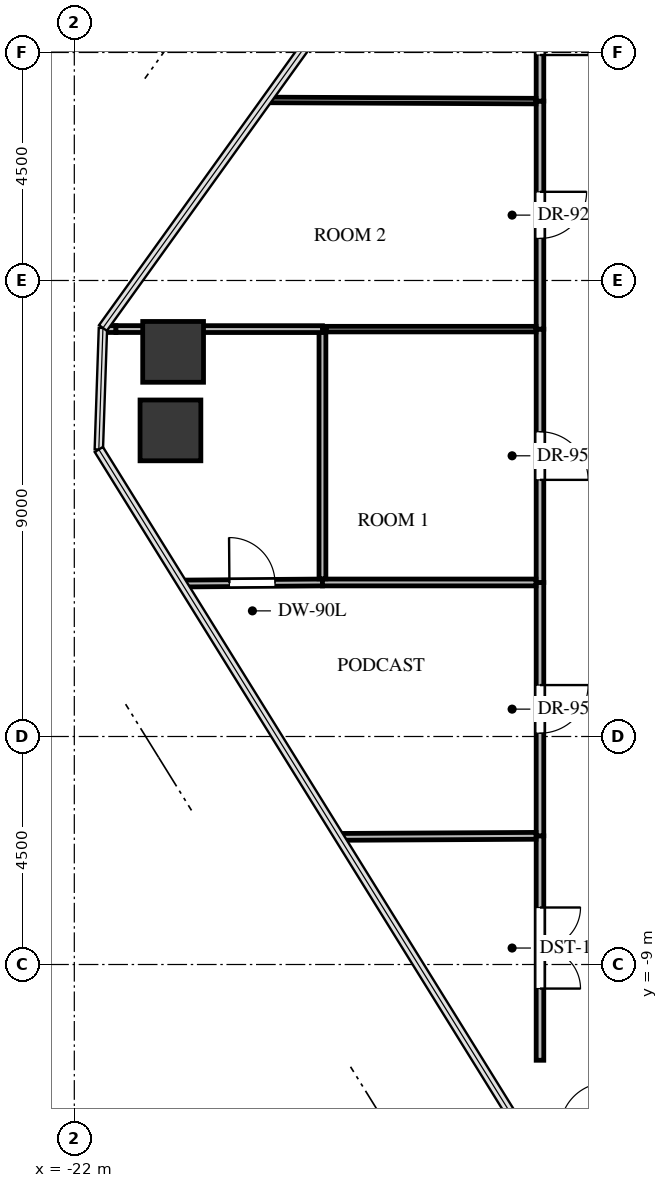
"""IFC4 building model, lengths in metres.
Left out: names, types, materials, properties, quantities, classifications, styles, units other than length and angle.
Written with IfcOpenShell. Run it as: python <this file> out.ifc"""

import sys

from ifc_helpers import new_model, si_unit, direction, frame, frame_2d, origin, origin_2d, place, context, subcontext, project, spatial, rectangle, extrude, source, transform, mapped, element, fill, save


model = new_model("IFC4")
c1 = context("Model", 3, precision=1e-05, world=origin(), true_north=direction((0.0, 1.0)))
c2 = subcontext(c1, "Body", "Model", "MODEL_VIEW")
j1 = project(units=[si_unit("LENGTHUNIT", "METRE"), si_unit("PLANEANGLEUNIT", "RADIAN")], contexts=[c1])
p1 = place(None, origin())
s1 = spatial("IfcSite", under=j1, at=p1, CompositionType="ELEMENT")
p2 = place(p1, origin())
s2 = spatial("IfcBuilding", under=s1, at=p2, CompositionType="ELEMENT")
p3 = place(p2, frame((0.0, 0.0, 127.2)))
s3 = spatial("IfcBuildingStorey", under=s2, at=p3, CompositionType="ELEMENT", Elevation=127.2)
m1 = source(origin(), c2, "Body", "SweptSolid", [
    extrude(rectangle(XDim=1.2, YDim=1.2, at=origin_2d()), origin(), (0.0, 0.0, 1.0), 3.3),
])
for number, where, z_axis, x_axis in (
    (1, (-20.103, 1.542, -0.24), (0.0, 0.0, 1.0), (1.0, 0.0, 0.0)),
    (2, (-20.05, 3.091, -0.24), (0.0, 0.0, 1.0), (1.0, 0.0, 0.0)),
):
    element("IfcColumn", number, at=place(p3, frame(where, z_axis=z_axis, x_axis=x_axis)), inside=s3, PredefinedType="COLUMN", context=c2, shape_type="MappedRepresentation", body=[
        mapped(m1, transform((0.0, 0.0, 0.0), x_axis=(1.0, 0.0, 0.0), y_axis=(0.0, 1.0, 0.0), z_axis=(0.0, 0.0, 1.0), scale=1.0)),
    ])
p4 = place(p3, frame((-12.81, -6.46, 0.0), z_axis=(0.0, 0.0, 1.0), x_axis=(0.0, -1.0, 0.0)))
e3 = element("IfcWall", 3, at=p4, inside=s3, PredefinedType="PARTITIONING", context=c2, shape_type="SweptSolid", body=[
    extrude(rectangle(XDim=4.43, YDim=0.15, at=frame_2d((2.215, 0.0))), origin(), (0.0, 0.0, 1.0), 2.38),
])
p5 = place(p4, frame((1.415, 0.0, 0.0)))
e4 = element("IfcOpeningElement", 4, at=p5, cuts=e3, PredefinedType="OPENING", context=c2, shape_type="SweptSolid", body=[
    extrude(rectangle(XDim=1.6, YDim=2.15, at=frame_2d((0.8, 1.075))), frame((0.0, 0.085, 0.0), z_axis=(0.0, -1.0, 0.0), x_axis=(1.0, 0.0, 0.0)), (0.0, 0.0, 1.0), 0.17),
])
p6 = place(p3, frame((-12.81, -1.46, 0.0), z_axis=(0.0, 0.0, 1.0), x_axis=(0.0, -1.0, 0.0)))
e5 = element("IfcWall", 5, at=p6, inside=s3, PredefinedType="PARTITIONING", context=c2, shape_type="SweptSolid", body=[
    extrude(rectangle(XDim=5.0, YDim=0.15, at=frame_2d((2.5, 0.0))), origin(), (0.0, 0.0, 1.0), 3.045),
])
p7 = place(p6, frame((2.025, 0.0, 0.0)))
e6 = element("IfcOpeningElement", 6, at=p7, cuts=e5, PredefinedType="OPENING", context=c2, shape_type="SweptSolid", body=[
    extrude(rectangle(XDim=0.95, YDim=2.1, at=frame_2d((0.475, 1.05))), frame((0.0, 0.085, 0.0), z_axis=(0.0, -1.0, 0.0), x_axis=(1.0, 0.0, 0.0)), (0.0, 0.0, 1.0), 0.17),
])
p8 = place(p3, frame((-12.81, 3.54, 0.0), z_axis=(0.0, 0.0, 1.0), x_axis=(0.0, -1.0, 0.0)))
e7 = element("IfcWall", 7, at=p8, inside=s3, PredefinedType="PARTITIONING", context=c2, shape_type="SweptSolid", body=[
    extrude(rectangle(XDim=5.0, YDim=0.15, at=frame_2d((2.5, 0.0))), origin(), (0.0, 0.0, 1.0), 2.212),
])
p9 = place(p8, frame((2.025, 0.0, 0.0)))
e8 = element("IfcOpeningElement", 8, at=p9, cuts=e7, PredefinedType="OPENING", context=c2, shape_type="SweptSolid", body=[
    extrude(rectangle(XDim=0.95, YDim=2.1, at=frame_2d((0.475, 1.05))), frame((0.0, 0.085, 0.0), z_axis=(0.0, -1.0, 0.0), x_axis=(1.0, 0.0, 0.0)), (0.0, 0.0, 1.0), 0.17),
])
p10 = place(p3, frame((-12.81, 8.04, 0.0), z_axis=(0.0, 0.0, 1.0), x_axis=(0.0, -1.0, 0.0)))
e9 = element("IfcWall", 9, at=p10, inside=s3, PredefinedType="PARTITIONING", context=c2, shape_type="SweptSolid", body=[
    extrude(rectangle(XDim=4.5, YDim=0.15, at=frame_2d((2.25, 0.0))), origin(), (0.0, 0.0, 1.0), 3.045),
])
p11 = place(p10, frame((1.79, 0.0, 0.0)))
e10 = element("IfcOpeningElement", 10, at=p11, cuts=e9, PredefinedType="OPENING", context=c2, shape_type="SweptSolid", body=[
    extrude(rectangle(XDim=0.92, YDim=2.1, at=frame_2d((0.46, 1.05))), frame((0.0, 0.085, 0.0), z_axis=(0.0, -1.0, 0.0), x_axis=(1.0, 0.0, 0.0)), (0.0, 0.0, 1.0), 0.17),
])
p12 = place(p3, frame((-12.81, 10.81, 0.0), z_axis=(0.0, 0.0, 1.0), x_axis=(0.0, -1.0, 0.0)))
e11 = element("IfcWall", 11, at=p12, inside=s3, PredefinedType="PARTITIONING", context=c2, shape_type="SweptSolid", body=[
    extrude(rectangle(XDim=2.77, YDim=0.15, at=frame_2d((1.385, 0.0))), origin(), (0.0, 0.0, 1.0), 3.045),
])
p13 = place(p12, frame((0.91, 0.0, 0.0)))
e12 = element("IfcOpeningElement", 12, at=p13, cuts=e11, PredefinedType="OPENING", context=c2, shape_type="SweptSolid", body=[
    extrude(rectangle(XDim=0.95, YDim=2.1, at=frame_2d((0.475, 1.05))), frame((0.0, 0.085, 0.0), z_axis=(0.0, -1.0, 0.0), x_axis=(1.0, 0.0, 0.0)), (0.0, 0.0, 1.0), 0.17),
])
p14 = place(p3, frame((-16.774, -6.481, 0.0), z_axis=(0.0, 0.0, 1.0), x_axis=(0.999985736048, 0.005341132812, 0.0)))
e13 = element("IfcWall", 13, at=p14, inside=s3, PredefinedType="PARTITIONING", context=c2, shape_type="SweptSolid", body=[
    extrude(rectangle(XDim=3.885, YDim=0.135, at=frame_2d((1.943, 0.0))), origin(), (0.0, 0.0, 1.0), 2.38),
])
p15 = place(p3, frame((-19.875, -1.481, 0.0), z_axis=(0.0, 0.0, 1.0), x_axis=(0.999970654695, 0.007660923473, 0.0)))
e14 = element("IfcWall", 14, at=p15, inside=s3, PredefinedType="PARTITIONING", context=c2, shape_type="SweptSolid", body=[
    extrude(rectangle(XDim=2.772, YDim=0.135, at=frame_2d((1.386, 0.0))), origin(), (0.0, 0.0, 1.0), 2.38),
])
p16 = place(p15, frame((0.936, 0.0, 0.0)))
e15 = element("IfcOpeningElement", 15, at=p16, cuts=e14, PredefinedType="OPENING", context=c2, shape_type="SweptSolid", body=[
    extrude(rectangle(XDim=0.9, YDim=2.05, at=frame_2d((0.45, 1.025))), frame((0.0, 0.078, 0.0), z_axis=(0.0, -1.0, 0.0), x_axis=(1.0, 0.0, 0.0)), (0.0, 0.0, 1.0), 0.155),
])
p17 = place(p3, frame((-17.103, -1.46, 0.0), z_axis=(0.0, 0.0, 1.0), x_axis=(1.0, 0.0, 0.0)))
e16 = element("IfcWall", 16, at=p17, inside=s3, PredefinedType="PARTITIONING", context=c2, shape_type="SweptSolid", body=[
    extrude(rectangle(XDim=4.214, YDim=0.135, at=frame_2d((2.107, 0.0))), origin(), (0.0, 0.0, 1.0), 3.045),
])
p18 = place(p3, frame((-17.103, 3.54, 0.0), z_axis=(0.0, 0.0, 1.0), x_axis=(0.0, -1.0, 0.0)))
e17 = element("IfcWall", 17, at=p18, inside=s3, PredefinedType="PARTITIONING", context=c2, shape_type="SweptSolid", body=[
    extrude(rectangle(XDim=4.928, YDim=0.135, at=frame_2d((2.464, 0.0))), origin(), (0.0, 0.0, 1.0), 2.212),
])
p19 = place(p3, frame((-21.436, 3.542, 0.0), z_axis=(0.0, 0.0, 1.0), x_axis=(0.999999550774, -0.000947866873, 0.0)))
e18 = element("IfcWall", 18, at=p19, inside=s3, PredefinedType="PARTITIONING", context=c2, shape_type="SweptSolid", body=[
    extrude(rectangle(XDim=0.258, YDim=0.135, at=frame_2d((0.129, 0.0))), origin(), (0.0, 0.0, 1.0), 1.877),
])
p20 = place(p3, frame((-20.175, 3.541, 0.0), z_axis=(0.0, 0.0, 1.0), x_axis=(0.999999949473, -0.0003178892, 0.0)))
e19 = element("IfcWall", 19, at=p20, inside=s3, PredefinedType="PARTITIONING", context=c2, shape_type="SweptSolid", body=[
    extrude(rectangle(XDim=3.072, YDim=0.135, at=frame_2d((1.536, 0.0))), origin(), (0.0, 0.0, 1.0), 1.877),
])
p21 = place(p3, frame((-21.178, 3.541, 0.0), z_axis=(0.0, 0.0, 1.0), x_axis=(0.999999970372, -0.000243427451, 0.0)))
e20 = element("IfcWall", 20, at=p21, inside=s3, PredefinedType="PARTITIONING", context=c2, shape_type="SweptSolid", body=[
    extrude(rectangle(XDim=1.003, YDim=0.135, at=frame_2d((0.501, 0.0))), origin(), (0.0, 0.0, 1.0), 1.877),
])
p22 = place(p3, frame((-17.031, 3.54, 0.0), z_axis=(0.0, 0.0, 1.0), x_axis=(1.0, 0.0, 0.0)))
e21 = element("IfcWall", 21, at=p22, inside=s3, PredefinedType="MOVABLE", context=c2, shape_type="SweptSolid", body=[
    extrude(rectangle(XDim=4.143, YDim=0.11, at=frame_2d((2.071, 0.0))), origin(), (0.0, 0.0, 1.0), 3.045),
])
p23 = place(p3, frame((-18.202, 8.063, 0.0), z_axis=(0.0, 0.0, 1.0), x_axis=(0.999990671281, -0.004319415637, 0.0)))
e22 = element("IfcWall", 22, at=p23, inside=s3, PredefinedType="MOVABLE", context=c2, shape_type="SweptSolid", body=[
    extrude(rectangle(XDim=5.313, YDim=0.11, at=frame_2d((2.656, 0.0))), origin(), (0.0, 0.0, 1.0), 2.38),
])
m2 = source(origin(), c2, "Body", "SweptSolid", [
    extrude(rectangle(XDim=1.6, YDim=2.15, at=frame_2d((0.8, 1.075))), frame((0.0, 0.025, 0.0), z_axis=(0.0, -1.0, 0.0), x_axis=(1.0, 0.0, 0.0)), (0.0, 0.0, 1.0), 0.05),
])
p24 = place(p5, origin())
e23 = element("IfcDoor", 23, at=p24, inside=s3, OperationType="DOUBLE_DOOR_SINGLE_SWING", PredefinedType="DOOR", context=c2, shape_type="MappedRepresentation", body=[
    mapped(m2, transform((0.0, 0.0, 0.0), x_axis=(1.0, 0.0, 0.0), y_axis=(0.0, 1.0, 0.0), z_axis=(0.0, 0.0, 1.0), scale=1.0)),
])
fill(e4, e23)
m3 = source(origin(), c2, "Body", "SweptSolid", [
    extrude(rectangle(XDim=0.95, YDim=2.1, at=frame_2d((0.475, 1.05))), frame((0.0, 0.025, 0.0), z_axis=(0.0, -1.0, 0.0), x_axis=(1.0, 0.0, 0.0)), (0.0, 0.0, 1.0), 0.05),
])
p25 = place(p7, origin())
e24 = element("IfcDoor", 24, at=p25, inside=s3, OperationType="SINGLE_SWING_LEFT", PredefinedType="DOOR", context=c2, shape_type="MappedRepresentation", body=[
    mapped(m3, transform((0.0, 0.0, 0.0), x_axis=(1.0, 0.0, 0.0), y_axis=(0.0, 1.0, 0.0), z_axis=(0.0, 0.0, 1.0), scale=1.0)),
])
fill(e6, e24)
m4 = source(origin(), c2, "Body", "SweptSolid", [
    extrude(rectangle(XDim=0.95, YDim=2.1, at=frame_2d((0.475, 1.05))), frame((0.0, 0.025, 0.0), z_axis=(0.0, -1.0, 0.0), x_axis=(1.0, 0.0, 0.0)), (0.0, 0.0, 1.0), 0.05),
])
p26 = place(p9, origin())
e25 = element("IfcDoor", 25, at=p26, inside=s3, OperationType="SINGLE_SWING_RIGHT", PredefinedType="DOOR", context=c2, shape_type="MappedRepresentation", body=[
    mapped(m4, transform((0.0, 0.0, 0.0), x_axis=(1.0, 0.0, 0.0), y_axis=(0.0, 1.0, 0.0), z_axis=(0.0, 0.0, 1.0), scale=1.0)),
])
fill(e8, e25)
m5 = source(origin(), c2, "Body", "SweptSolid", [
    extrude(rectangle(XDim=0.92, YDim=2.1, at=frame_2d((0.46, 1.05))), frame((0.0, 0.025, 0.0), z_axis=(0.0, -1.0, 0.0), x_axis=(1.0, 0.0, 0.0)), (0.0, 0.0, 1.0), 0.05),
])
p27 = place(p11, origin())
e26 = element("IfcDoor", 26, at=p27, inside=s3, OperationType="SINGLE_SWING_LEFT", PredefinedType="DOOR", context=c2, shape_type="MappedRepresentation", body=[
    mapped(m5, transform((0.0, 0.0, 0.0), x_axis=(1.0, 0.0, 0.0), y_axis=(0.0, 1.0, 0.0), z_axis=(0.0, 0.0, 1.0), scale=1.0)),
])
fill(e10, e26)
p28 = place(p13, origin())
e27 = element("IfcDoor", 27, at=p28, inside=s3, OperationType="SINGLE_SWING_RIGHT", PredefinedType="DOOR", context=c2, shape_type="MappedRepresentation", body=[
    mapped(m4, transform((0.0, 0.0, 0.0), x_axis=(1.0, 0.0, 0.0), y_axis=(0.0, 1.0, 0.0), z_axis=(0.0, 0.0, 1.0), scale=1.0)),
])
fill(e12, e27)
m6 = source(origin(), c2, "Body", "SweptSolid", [
    extrude(rectangle(XDim=0.9, YDim=2.05, at=frame_2d((0.45, 1.025))), frame((0.0, 0.025, 0.0), z_axis=(0.0, -1.0, 0.0), x_axis=(1.0, 0.0, 0.0)), (0.0, 0.0, 1.0), 0.05),
])
p29 = place(p16, origin())
e28 = element("IfcDoor", 28, at=p29, inside=s3, OperationType="SINGLE_SWING_LEFT", PredefinedType="DOOR", context=c2, shape_type="MappedRepresentation", body=[
    mapped(m6, transform((0.0, 0.0, 0.0), x_axis=(1.0, 0.0, 0.0), y_axis=(0.0, 1.0, 0.0), z_axis=(0.0, 0.0, 1.0), scale=1.0)),
])
fill(e15, e28)
save(model, sys.argv[1])
